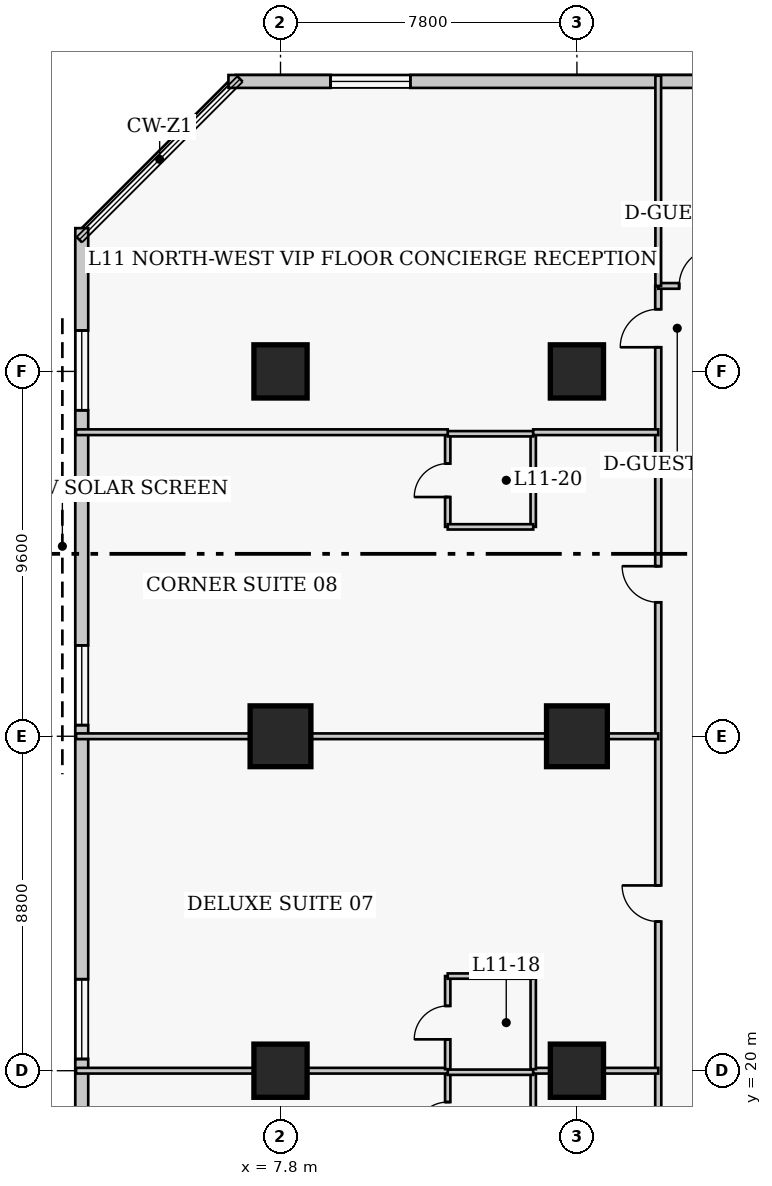
"""IFC4 building model, lengths in metres.
Left out: names, types, materials, properties, quantities, classifications, styles, units other than length and angle.
Written with IfcOpenShell. Run it as: python <this file> out.ifc"""

import sys

from ifc_helpers import new_model, si_unit, direction, frame, frame_2d, origin, origin_2d, place, context, subcontext, project, spatial, rectangle, extrude, element, fill, save


model = new_model("IFC4")
c1 = context("Model", 3, precision=1e-05, world=origin(), true_north=direction((0.0, 1.0)))
c2 = subcontext(c1, "Body", "Model", "MODEL_VIEW")
j1 = project(units=[si_unit("LENGTHUNIT", "METRE"), si_unit("PLANEANGLEUNIT", "RADIAN")], contexts=[c1])
p1 = place(None, origin())
s1 = spatial("IfcSite", under=j1, at=p1, CompositionType="ELEMENT")
p2 = place(p1, origin())
s2 = spatial("IfcBuilding", under=s1, at=p2, CompositionType="ELEMENT")
p3 = place(p2, frame((0.0, 0.0, 48.8)))
s3 = spatial("IfcBuildingStorey", under=s2, at=p3, CompositionType="ELEMENT", Elevation=48.8)
p4 = place(p3, frame((7.8, 20.0, 0.0), z_axis=(0.0, 0.0, 1.0), x_axis=(1.0, 0.0, 0.0)))
e1 = element("IfcColumn", 1, at=p4, inside=s3, PredefinedType="COLUMN", context=c2, shape_type="SweptSolid", body=[
    extrude(rectangle(XDim=1.4, YDim=1.4, at=origin_2d()), origin(), (0.0, 0.0, 1.0), 3.8),
])
p5 = place(p3, frame((7.8, 28.8, 0.0), z_axis=(0.0, 0.0, 1.0), x_axis=(1.0, 0.0, 0.0)))
e2 = element("IfcColumn", 2, at=p5, inside=s3, PredefinedType="COLUMN", context=c2, shape_type="SweptSolid", body=[
    extrude(rectangle(XDim=1.6, YDim=1.6, at=origin_2d()), origin(), (0.0, 0.0, 1.0), 3.8),
])
for number, where, z_axis, x_axis in (
    (3, (7.8, 38.4, 0.0), (0.0, 0.0, 1.0), (1.0, 0.0, 0.0)),
    (4, (15.6, 20.0, 0.0), (0.0, 0.0, 1.0), (1.0, 0.0, 0.0)),
):
    element("IfcColumn", number, at=place(p3, frame(where, z_axis=z_axis, x_axis=x_axis)), inside=s3, PredefinedType="COLUMN", context=c2, shape_type="SweptSolid", body=[
        extrude(rectangle(XDim=1.4, YDim=1.4, at=origin_2d()), origin(), (0.0, 0.0, 1.0), 3.8),
    ])
p6 = place(p3, frame((15.6, 28.8, 0.0), z_axis=(0.0, 0.0, 1.0), x_axis=(1.0, 0.0, 0.0)))
e5 = element("IfcColumn", 5, at=p6, inside=s3, PredefinedType="COLUMN", context=c2, shape_type="SweptSolid", body=[
    extrude(rectangle(XDim=1.6, YDim=1.6, at=origin_2d()), origin(), (0.0, 0.0, 1.0), 3.8),
])
p7 = place(p3, frame((15.6, 38.4, 0.0), z_axis=(0.0, 0.0, 1.0), x_axis=(1.0, 0.0, 0.0)))
e6 = element("IfcColumn", 6, at=p7, inside=s3, PredefinedType="COLUMN", context=c2, shape_type="SweptSolid", body=[
    extrude(rectangle(XDim=1.4, YDim=1.4, at=origin_2d()), origin(), (0.0, 0.0, 1.0), 3.8),
])
p8 = place(p3, frame((36.32, 46.03, 0.0), z_axis=(0.0, 0.0, 1.0), x_axis=(-1.0, 0.0, 0.0)))
e7 = element("IfcWall", 7, at=p8, inside=s3, PredefinedType="SOLIDWALL", context=c2, shape_type="SweptSolid", body=[
    extrude(rectangle(XDim=29.89, YDim=0.34, at=frame_2d((14.945, 0.0))), origin(), (0.0, 0.0, 1.0), 3.54),
])
p9 = place(p8, frame((2.686, 0.0, 0.85)))
e8 = element("IfcOpeningElement", 8, at=p9, cuts=e7, PredefinedType="OPENING", context=c2, shape_type="SweptSolid", body=[
    extrude(rectangle(XDim=2.1, YDim=1.85, at=frame_2d((1.05, 0.925))), frame((0.0, 0.18, 0.0), z_axis=(0.0, -1.0, 0.0), x_axis=(1.0, 0.0, 0.0)), (0.0, 0.0, 1.0), 0.36),
])
p10 = place(p8, frame((10.159, 0.0, 0.85)))
e9 = element("IfcOpeningElement", 9, at=p10, cuts=e7, PredefinedType="OPENING", context=c2, shape_type="SweptSolid", body=[
    extrude(rectangle(XDim=2.1, YDim=1.85, at=frame_2d((1.05, 0.925))), frame((0.0, 0.18, 0.0), z_axis=(0.0, -1.0, 0.0), x_axis=(1.0, 0.0, 0.0)), (0.0, 0.0, 1.0), 0.36),
])
p11 = place(p8, frame((25.104, 0.0, 0.85)))
e10 = element("IfcOpeningElement", 10, at=p11, cuts=e7, PredefinedType="OPENING", context=c2, shape_type="SweptSolid", body=[
    extrude(rectangle(XDim=2.1, YDim=1.85, at=frame_2d((1.05, 0.925))), frame((0.0, 0.18, 0.0), z_axis=(0.0, -1.0, 0.0), x_axis=(1.0, 0.0, 0.0)), (0.0, 0.0, 1.0), 0.36),
])
p12 = place(p3, frame((2.57, 42.17, 0.0), z_axis=(0.0, 0.0, 1.0), x_axis=(0.0, -1.0, 0.0)))
e11 = element("IfcWall", 11, at=p12, inside=s3, PredefinedType="SOLIDWALL", context=c2, shape_type="SweptSolid", body=[
    extrude(rectangle(XDim=35.14, YDim=0.34, at=frame_2d((17.57, 0.0))), origin(), (0.0, 0.0, 1.0), 3.54),
])
p13 = place(p12, frame((2.692, 0.0, 0.85)))
e12 = element("IfcOpeningElement", 12, at=p13, cuts=e11, PredefinedType="OPENING", context=c2, shape_type="SweptSolid", body=[
    extrude(rectangle(XDim=2.1, YDim=1.85, at=frame_2d((1.05, 0.925))), frame((0.0, 0.18, 0.0), z_axis=(0.0, -1.0, 0.0), x_axis=(1.0, 0.0, 0.0)), (0.0, 0.0, 1.0), 0.36),
])
p14 = place(p12, frame((10.978, 0.0, 0.85)))
e13 = element("IfcOpeningElement", 13, at=p14, cuts=e11, PredefinedType="OPENING", context=c2, shape_type="SweptSolid", body=[
    extrude(rectangle(XDim=2.1, YDim=1.85, at=frame_2d((1.05, 0.925))), frame((0.0, 0.18, 0.0), z_axis=(0.0, -1.0, 0.0), x_axis=(1.0, 0.0, 0.0)), (0.0, 0.0, 1.0), 0.36),
])
p15 = place(p12, frame((19.762, 0.0, 0.85)))
e14 = element("IfcOpeningElement", 14, at=p15, cuts=e11, PredefinedType="OPENING", context=c2, shape_type="SweptSolid", body=[
    extrude(rectangle(XDim=2.1, YDim=1.85, at=frame_2d((1.05, 0.925))), frame((0.0, 0.18, 0.0), z_axis=(0.0, -1.0, 0.0), x_axis=(1.0, 0.0, 0.0)), (0.0, 0.0, 1.0), 0.36),
])
p16 = place(p12, frame((28.548, 0.0, 0.85)))
e15 = element("IfcOpeningElement", 15, at=p16, cuts=e11, PredefinedType="OPENING", context=c2, shape_type="SweptSolid", body=[
    extrude(rectangle(XDim=2.1, YDim=1.85, at=frame_2d((1.05, 0.925))), frame((0.0, 0.18, 0.0), z_axis=(0.0, -1.0, 0.0), x_axis=(1.0, 0.0, 0.0)), (0.0, 0.0, 1.0), 0.36),
])
p17 = place(p3, frame((17.74, 5.05, 0.0), z_axis=(0.0, 0.0, 1.0), x_axis=(0.0, 1.0, 0.0)))
e16 = element("IfcWall", 16, at=p17, inside=s3, PredefinedType="PARTITIONING", context=c2, shape_type="SweptSolid", body=[
    extrude(rectangle(XDim=35.6, YDim=0.16, at=frame_2d((17.8, 0.0))), origin(), (0.0, 0.0, 1.0), 3.54),
])
p18 = place(p17, frame((2.6, 0.0, 0.0)))
e17 = element("IfcOpeningElement", 17, at=p18, cuts=e16, PredefinedType="OPENING", context=c2, shape_type="SweptSolid", body=[
    extrude(rectangle(XDim=0.95, YDim=2.1, at=frame_2d((0.475, 1.05))), frame((0.0, 0.09, 0.0), z_axis=(0.0, -1.0, 0.0), x_axis=(1.0, 0.0, 0.0)), (0.0, 0.0, 1.0), 0.18),
])
p19 = place(p17, frame((10.075, 0.0, 0.0)))
e18 = element("IfcOpeningElement", 18, at=p19, cuts=e16, PredefinedType="OPENING", context=c2, shape_type="SweptSolid", body=[
    extrude(rectangle(XDim=0.95, YDim=2.1, at=frame_2d((0.475, 1.05))), frame((0.0, 0.09, 0.0), z_axis=(0.0, -1.0, 0.0), x_axis=(1.0, 0.0, 0.0)), (0.0, 0.0, 1.0), 0.18),
])
p20 = place(p17, frame((18.875, 0.0, 0.0)))
e19 = element("IfcOpeningElement", 19, at=p20, cuts=e16, PredefinedType="OPENING", context=c2, shape_type="SweptSolid", body=[
    extrude(rectangle(XDim=0.95, YDim=2.1, at=frame_2d((0.475, 1.05))), frame((0.0, 0.09, 0.0), z_axis=(0.0, -1.0, 0.0), x_axis=(1.0, 0.0, 0.0)), (0.0, 0.0, 1.0), 0.18),
])
p21 = place(p17, frame((27.275, 0.0, 0.0)))
e20 = element("IfcOpeningElement", 20, at=p21, cuts=e16, PredefinedType="OPENING", context=c2, shape_type="SweptSolid", body=[
    extrude(rectangle(XDim=0.95, YDim=2.1, at=frame_2d((0.475, 1.05))), frame((0.0, 0.09, 0.0), z_axis=(0.0, -1.0, 0.0), x_axis=(1.0, 0.0, 0.0)), (0.0, 0.0, 1.0), 0.18),
])
p22 = place(p17, frame((33.986, 0.0, 0.0)))
e21 = element("IfcOpeningElement", 21, at=p22, cuts=e16, PredefinedType="OPENING", context=c2, shape_type="SweptSolid", body=[
    extrude(rectangle(XDim=1.0, YDim=2.15, at=frame_2d((0.5, 1.075))), frame((0.0, 0.09, 0.0), z_axis=(0.0, -1.0, 0.0), x_axis=(1.0, 0.0, 0.0)), (0.0, 0.0, 1.0), 0.18),
])
p23 = place(p3, frame((17.74, 40.65, 0.0), z_axis=(0.0, 0.0, 1.0), x_axis=(1.0, 0.0, 0.0)))
e22 = element("IfcWall", 22, at=p23, inside=s3, PredefinedType="PARTITIONING", context=c2, shape_type="SweptSolid", body=[
    extrude(rectangle(XDim=4.36, YDim=0.15, at=frame_2d((2.18, 0.0))), origin(), (0.0, 0.0, 1.0), 3.54),
])
p24 = place(p23, frame((0.55, 0.0, 0.0)))
e23 = element("IfcOpeningElement", 23, at=p24, cuts=e22, PredefinedType="OPENING", context=c2, shape_type="SweptSolid", body=[
    extrude(rectangle(XDim=1.0, YDim=2.15, at=frame_2d((0.5, 1.075))), frame((0.0, 0.085, 0.0), z_axis=(0.0, -1.0, 0.0), x_axis=(1.0, 0.0, 0.0)), (0.0, 0.0, 1.0), 0.17),
])
p25 = place(p3, frame((17.74, 40.65, 0.0), z_axis=(0.0, 0.0, 1.0), x_axis=(0.0, 1.0, 0.0)))
e24 = element("IfcWall", 24, at=p25, inside=s3, PredefinedType="PARTITIONING", context=c2, shape_type="SweptSolid", body=[
    extrude(rectangle(XDim=5.53, YDim=0.15, at=frame_2d((2.765, 0.0))), origin(), (0.0, 0.0, 1.0), 3.54),
])
p26 = place(p3, frame((12.2, 17.51, 0.0), z_axis=(0.0, 0.0, 1.0), x_axis=(0.0, 1.0, 0.0)))
e25 = element("IfcWall", 25, at=p26, inside=s3, PredefinedType="PLUMBINGWALL", context=c2, shape_type="SweptSolid", body=[
    extrude(rectangle(XDim=2.45, YDim=0.14, at=frame_2d((1.225, 0.0))), origin(), (0.0, 0.0, 1.0), 3.54),
])
p27 = place(p26, frame((0.785, 0.0, 0.0)))
e26 = element("IfcOpeningElement", 26, at=p27, cuts=e25, PredefinedType="OPENING", context=c2, shape_type="SweptSolid", body=[
    extrude(rectangle(XDim=0.88, YDim=2.05, at=frame_2d((0.44, 1.025))), frame((0.0, 0.08, 0.0), z_axis=(0.0, -1.0, 0.0), x_axis=(1.0, 0.0, 0.0)), (0.0, 0.0, 1.0), 0.16),
])
p28 = place(p3, frame((14.45, 17.51, 0.0), z_axis=(0.0, 0.0, 1.0), x_axis=(0.0, 1.0, 0.0)))
e27 = element("IfcWall", 27, at=p28, inside=s3, PredefinedType="PLUMBINGWALL", context=c2, shape_type="SweptSolid", body=[
    extrude(rectangle(XDim=2.45, YDim=0.14, at=frame_2d((1.225, 0.0))), origin(), (0.0, 0.0, 1.0), 3.54),
])
p29 = place(p3, frame((12.2, 19.96, 0.0), z_axis=(0.0, 0.0, 1.0), x_axis=(1.0, 0.0, 0.0)))
e28 = element("IfcWall", 28, at=p29, inside=s3, PredefinedType="PLUMBINGWALL", context=c2, shape_type="SweptSolid", body=[
    extrude(rectangle(XDim=2.25, YDim=0.14, at=frame_2d((1.125, 0.0))), origin(), (0.0, 0.0, 1.0), 2.593),
])
p30 = place(p3, frame((2.42, 20.0, 0.0), z_axis=(0.0, 0.0, 1.0), x_axis=(1.0, 0.0, 0.0)))
e29 = element("IfcWall", 29, at=p30, inside=s3, PredefinedType="PARTITIONING", context=c2, shape_type="SweptSolid", body=[
    extrude(rectangle(XDim=9.78, YDim=0.15, at=frame_2d((4.89, 0.0))), origin(), (0.0, 0.0, 1.0), 2.593),
])
p31 = place(p3, frame((14.45, 20.0, 0.0), z_axis=(0.0, 0.0, 1.0), x_axis=(1.0, 0.0, 0.0)))
e30 = element("IfcWall", 30, at=p31, inside=s3, PredefinedType="PARTITIONING", context=c2, shape_type="SweptSolid", body=[
    extrude(rectangle(XDim=3.29, YDim=0.15, at=frame_2d((1.645, 0.0))), origin(), (0.0, 0.0, 1.0), 2.593),
])
p32 = place(p3, frame((12.2, 20.04, 0.0), z_axis=(0.0, 0.0, 1.0), x_axis=(0.0, 1.0, 0.0)))
e31 = element("IfcWall", 31, at=p32, inside=s3, PredefinedType="PLUMBINGWALL", context=c2, shape_type="SweptSolid", body=[
    extrude(rectangle(XDim=2.45, YDim=0.14, at=frame_2d((1.225, 0.0))), origin(), (0.0, 0.0, 1.0), 3.54),
])
p33 = place(p32, frame((0.785, 0.0, 0.0)))
e32 = element("IfcOpeningElement", 32, at=p33, cuts=e31, PredefinedType="OPENING", context=c2, shape_type="SweptSolid", body=[
    extrude(rectangle(XDim=0.88, YDim=2.05, at=frame_2d((0.44, 1.025))), frame((0.0, 0.08, 0.0), z_axis=(0.0, -1.0, 0.0), x_axis=(1.0, 0.0, 0.0)), (0.0, 0.0, 1.0), 0.16),
])
p34 = place(p3, frame((14.45, 20.04, 0.0), z_axis=(0.0, 0.0, 1.0), x_axis=(0.0, 1.0, 0.0)))
e33 = element("IfcWall", 33, at=p34, inside=s3, PredefinedType="PLUMBINGWALL", context=c2, shape_type="SweptSolid", body=[
    extrude(rectangle(XDim=2.45, YDim=0.14, at=frame_2d((1.225, 0.0))), origin(), (0.0, 0.0, 1.0), 3.54),
])
p35 = place(p3, frame((12.2, 22.49, 0.0), z_axis=(0.0, 0.0, 1.0), x_axis=(1.0, 0.0, 0.0)))
e34 = element("IfcWall", 34, at=p35, inside=s3, PredefinedType="PLUMBINGWALL", context=c2, shape_type="SweptSolid", body=[
    extrude(rectangle(XDim=2.25, YDim=0.14, at=frame_2d((1.125, 0.0))), origin(), (0.0, 0.0, 1.0), 3.54),
])
p36 = place(p3, frame((2.42, 28.8, 0.0), z_axis=(0.0, 0.0, 1.0), x_axis=(1.0, 0.0, 0.0)))
e35 = element("IfcWall", 35, at=p36, inside=s3, PredefinedType="PARTITIONING", context=c2, shape_type="SweptSolid", body=[
    extrude(rectangle(XDim=15.32, YDim=0.15, at=frame_2d((7.66, 0.0))), origin(), (0.0, 0.0, 1.0), 2.593),
])
p37 = place(p3, frame((12.2, 34.31, 0.0), z_axis=(0.0, 0.0, 1.0), x_axis=(0.0, 1.0, 0.0)))
e36 = element("IfcWall", 36, at=p37, inside=s3, PredefinedType="PLUMBINGWALL", context=c2, shape_type="SweptSolid", body=[
    extrude(rectangle(XDim=2.45, YDim=0.14, at=frame_2d((1.225, 0.0))), origin(), (0.0, 0.0, 1.0), 3.54),
])
p38 = place(p37, frame((0.785, 0.0, 0.0)))
e37 = element("IfcOpeningElement", 37, at=p38, cuts=e36, PredefinedType="OPENING", context=c2, shape_type="SweptSolid", body=[
    extrude(rectangle(XDim=0.88, YDim=2.05, at=frame_2d((0.44, 1.025))), frame((0.0, 0.08, 0.0), z_axis=(0.0, -1.0, 0.0), x_axis=(1.0, 0.0, 0.0)), (0.0, 0.0, 1.0), 0.16),
])
p39 = place(p3, frame((14.45, 34.31, 0.0), z_axis=(0.0, 0.0, 1.0), x_axis=(0.0, 1.0, 0.0)))
e38 = element("IfcWall", 38, at=p39, inside=s3, PredefinedType="PLUMBINGWALL", context=c2, shape_type="SweptSolid", body=[
    extrude(rectangle(XDim=2.45, YDim=0.14, at=frame_2d((1.225, 0.0))), origin(), (0.0, 0.0, 1.0), 3.54),
])
for number, where, z_axis, x_axis in (
    (39, (12.2, 34.31, 0.0), (0.0, 0.0, 1.0), (1.0, 0.0, 0.0)),
    (40, (12.2, 36.76, 0.0), (0.0, 0.0, 1.0), (1.0, 0.0, 0.0)),
):
    element("IfcWall", number, at=place(p3, frame(where, z_axis=z_axis, x_axis=x_axis)), inside=s3, PredefinedType="PLUMBINGWALL", context=c2, shape_type="SweptSolid", body=[
        extrude(rectangle(XDim=2.25, YDim=0.14, at=frame_2d((1.125, 0.0))), origin(), (0.0, 0.0, 1.0), 3.54),
    ])
p40 = place(p3, frame((2.42, 36.8, 0.0), z_axis=(0.0, 0.0, 1.0), x_axis=(1.0, 0.0, 0.0)))
e41 = element("IfcWall", 41, at=p40, inside=s3, PredefinedType="PARTITIONING", context=c2, shape_type="SweptSolid", body=[
    extrude(rectangle(XDim=9.78, YDim=0.15, at=frame_2d((4.89, 0.0))), origin(), (0.0, 0.0, 1.0), 3.54),
])
p41 = place(p3, frame((14.45, 36.8, 0.0), z_axis=(0.0, 0.0, 1.0), x_axis=(1.0, 0.0, 0.0)))
e42 = element("IfcWall", 42, at=p41, inside=s3, PredefinedType="PARTITIONING", context=c2, shape_type="SweptSolid", body=[
    extrude(rectangle(XDim=3.29, YDim=0.15, at=frame_2d((1.645, 0.0))), origin(), (0.0, 0.0, 1.0), 3.54),
])
p42 = place(p11, origin())
e43 = element("IfcWindow", 43, at=p42, inside=s3, PartitioningType="SINGLE_PANEL", PredefinedType="WINDOW", context=c2, shape_type="SweptSolid", body=[
    extrude(rectangle(XDim=2.1, YDim=1.85, at=frame_2d((1.05, 0.925))), frame((0.0, 0.03, 0.0), z_axis=(0.0, -1.0, 0.0), x_axis=(1.0, 0.0, 0.0)), (0.0, 0.0, 1.0), 0.06),
])
fill(e10, e43)
p43 = place(p13, origin())
e44 = element("IfcWindow", 44, at=p43, inside=s3, PartitioningType="SINGLE_PANEL", PredefinedType="WINDOW", context=c2, shape_type="SweptSolid", body=[
    extrude(rectangle(XDim=2.1, YDim=1.85, at=frame_2d((1.05, 0.925))), frame((0.0, 0.03, 0.0), z_axis=(0.0, -1.0, 0.0), x_axis=(1.0, 0.0, 0.0)), (0.0, 0.0, 1.0), 0.06),
])
fill(e12, e44)
p44 = place(p14, origin())
e45 = element("IfcWindow", 45, at=p44, inside=s3, PartitioningType="SINGLE_PANEL", PredefinedType="WINDOW", context=c2, shape_type="SweptSolid", body=[
    extrude(rectangle(XDim=2.1, YDim=1.85, at=frame_2d((1.05, 0.925))), frame((0.0, 0.03, 0.0), z_axis=(0.0, -1.0, 0.0), x_axis=(1.0, 0.0, 0.0)), (0.0, 0.0, 1.0), 0.06),
])
fill(e13, e45)
p45 = place(p15, origin())
e46 = element("IfcWindow", 46, at=p45, inside=s3, PartitioningType="SINGLE_PANEL", PredefinedType="WINDOW", context=c2, shape_type="SweptSolid", body=[
    extrude(rectangle(XDim=2.1, YDim=1.85, at=frame_2d((1.05, 0.925))), frame((0.0, 0.03, 0.0), z_axis=(0.0, -1.0, 0.0), x_axis=(1.0, 0.0, 0.0)), (0.0, 0.0, 1.0), 0.06),
])
fill(e14, e46)
p46 = place(p24, origin())
e47 = element("IfcDoor", 47, at=p46, inside=s3, OperationType="SINGLE_SWING_RIGHT", PredefinedType="DOOR", context=c2, shape_type="SweptSolid", body=[
    extrude(rectangle(XDim=1.0, YDim=2.15, at=frame_2d((0.5, 1.075))), frame((0.0, 0.025, 0.0), z_axis=(0.0, -1.0, 0.0), x_axis=(1.0, 0.0, 0.0)), (0.0, 0.0, 1.0), 0.05),
])
fill(e23, e47)
p47 = place(p27, origin())
e48 = element("IfcDoor", 48, at=p47, inside=s3, OperationType="SINGLE_SWING_LEFT", PredefinedType="DOOR", context=c2, shape_type="SweptSolid", body=[
    extrude(rectangle(XDim=0.88, YDim=2.05, at=frame_2d((0.44, 1.025))), frame((0.0, 0.025, 0.0), z_axis=(0.0, -1.0, 0.0), x_axis=(1.0, 0.0, 0.0)), (0.0, 0.0, 1.0), 0.05),
])
fill(e26, e48)
p48 = place(p33, origin())
e49 = element("IfcDoor", 49, at=p48, inside=s3, OperationType="SINGLE_SWING_LEFT", PredefinedType="DOOR", context=c2, shape_type="SweptSolid", body=[
    extrude(rectangle(XDim=0.88, YDim=2.05, at=frame_2d((0.44, 1.025))), frame((0.0, 0.025, 0.0), z_axis=(0.0, -1.0, 0.0), x_axis=(1.0, 0.0, 0.0)), (0.0, 0.0, 1.0), 0.05),
])
fill(e32, e49)
p49 = place(p20, origin())
e50 = element("IfcDoor", 50, at=p49, inside=s3, OperationType="SINGLE_SWING_RIGHT", PredefinedType="DOOR", context=c2, shape_type="SweptSolid", body=[
    extrude(rectangle(XDim=0.95, YDim=2.1, at=frame_2d((0.475, 1.05))), frame((0.0, 0.025, 0.0), z_axis=(0.0, -1.0, 0.0), x_axis=(1.0, 0.0, 0.0)), (0.0, 0.0, 1.0), 0.05),
])
fill(e19, e50)
p50 = place(p38, origin())
e51 = element("IfcDoor", 51, at=p50, inside=s3, OperationType="SINGLE_SWING_LEFT", PredefinedType="DOOR", context=c2, shape_type="SweptSolid", body=[
    extrude(rectangle(XDim=0.88, YDim=2.05, at=frame_2d((0.44, 1.025))), frame((0.0, 0.025, 0.0), z_axis=(0.0, -1.0, 0.0), x_axis=(1.0, 0.0, 0.0)), (0.0, 0.0, 1.0), 0.05),
])
fill(e37, e51)
p51 = place(p21, origin())
e52 = element("IfcDoor", 52, at=p51, inside=s3, OperationType="SINGLE_SWING_RIGHT", PredefinedType="DOOR", context=c2, shape_type="SweptSolid", body=[
    extrude(rectangle(XDim=0.95, YDim=2.1, at=frame_2d((0.475, 1.05))), frame((0.0, 0.025, 0.0), z_axis=(0.0, -1.0, 0.0), x_axis=(1.0, 0.0, 0.0)), (0.0, 0.0, 1.0), 0.05),
])
fill(e20, e52)
p52 = place(p22, origin())
e53 = element("IfcDoor", 53, at=p52, inside=s3, OperationType="SINGLE_SWING_LEFT", PredefinedType="DOOR", context=c2, shape_type="SweptSolid", body=[
    extrude(rectangle(XDim=1.0, YDim=2.15, at=frame_2d((0.5, 1.075))), frame((0.0, 0.025, 0.0), z_axis=(0.0, -1.0, 0.0), x_axis=(1.0, 0.0, 0.0)), (0.0, 0.0, 1.0), 0.05),
])
fill(e21, e53)
save(model, sys.argv[1])
